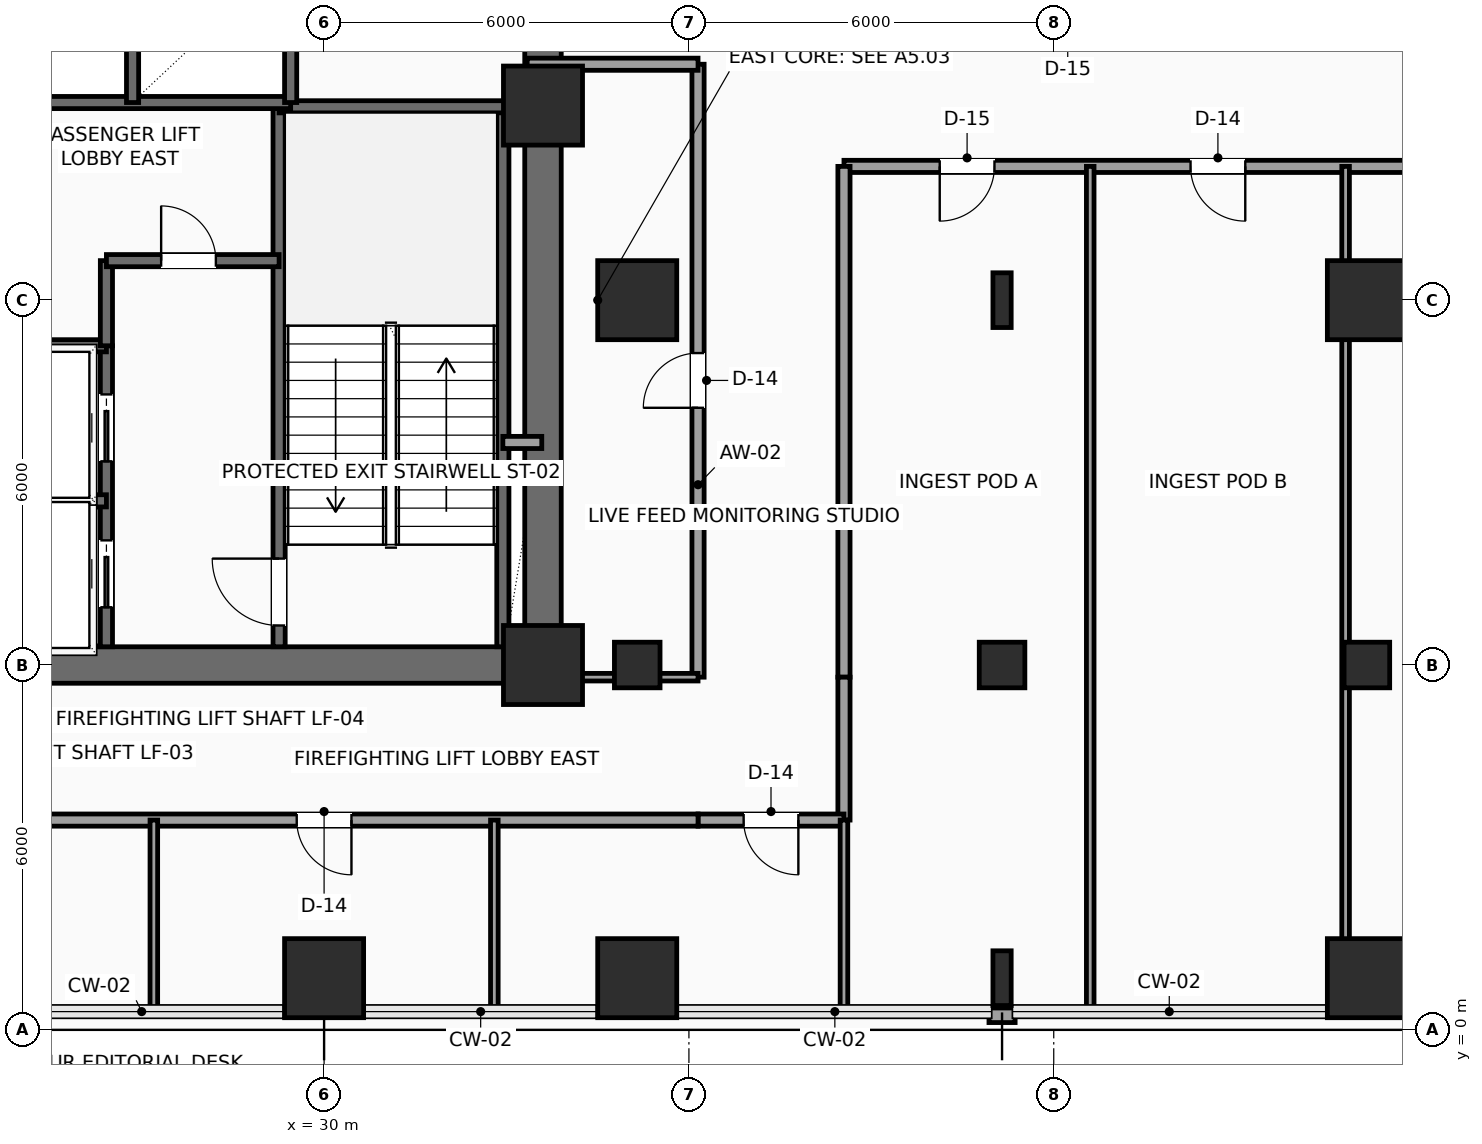
"""IFC4 building model, lengths in metres.
Left out: names, types, materials, properties, quantities, classifications, styles, units other than length and angle.
Written with IfcOpenShell. Run it as: python <this file> out.ifc"""

import sys

from ifc_helpers import new_model, si_unit, direction, frame, frame_2d, origin, origin_2d, place, context, subcontext, project, spatial, rectangle, hollow_rectangle, i_section, extrude, element, fill, save


model = new_model("IFC4")
c1 = context("Model", 3, precision=1e-05, world=origin(), true_north=direction((0.0, 1.0)))
c2 = subcontext(c1, "Body", "Model", "MODEL_VIEW")
j1 = project(units=[si_unit("LENGTHUNIT", "METRE"), si_unit("PLANEANGLEUNIT", "RADIAN")], contexts=[c1])
p1 = place(None, origin())
s1 = spatial("IfcSite", under=j1, at=p1, CompositionType="ELEMENT")
p2 = place(p1, origin())
s2 = spatial("IfcBuilding", under=s1, at=p2, CompositionType="ELEMENT")
p3 = place(p2, frame((0.0, 0.0, 48.0)))
s3 = spatial("IfcBuildingStorey", under=s2, at=p3, CompositionType="ELEMENT", Elevation=48.0)
for number, where, z_axis, x_axis in (
    (1, (33.6, 6.0, 0.0), (0.0, 0.0, 1.0), (1.0, 0.0, 0.0)),
    (2, (33.6, 15.2, 0.0), (0.0, 0.0, 1.0), (1.0, 0.0, 0.0)),
    (3, (30.0, 0.85, 0.0), (0.0, 0.0, 1.0), (1.0, 0.0, 0.0)),
    (4, (35.15, 0.85, 0.0), (0.0, 0.0, 1.0), (1.0, 0.0, 0.0)),
):
    element("IfcColumn", number, at=place(p3, frame(where, z_axis=z_axis, x_axis=x_axis)), inside=s3, PredefinedType="COLUMN", context=c2, shape_type="SweptSolid", body=[
        extrude(rectangle(XDim=1.3, YDim=1.3, at=origin_2d()), origin(), (0.0, 0.0, 1.0), 3.9),
    ])
p4 = place(p3, frame((35.15, 6.0, 0.0), z_axis=(0.0, 0.0, 1.0), x_axis=(1.0, 0.0, 0.0)))
e5 = element("IfcColumn", 5, at=p4, inside=s3, PredefinedType="COLUMN", context=c2, shape_type="SweptSolid", body=[
    extrude(hollow_rectangle(XDim=0.75, YDim=0.75, WallThickness=0.035, InnerFilletRadius=0.035, OuterFilletRadius=0.05, at=origin_2d()), origin(), (0.0, 0.0, 1.0), 3.9),
])
p5 = place(p3, frame((35.15, 12.0, 0.0), z_axis=(0.0, 0.0, 1.0), x_axis=(1.0, 0.0, 0.0)))
e6 = element("IfcColumn", 6, at=p5, inside=s3, PredefinedType="COLUMN", context=c2, shape_type="SweptSolid", body=[
    extrude(rectangle(XDim=1.3, YDim=1.3, at=origin_2d()), origin(), (0.0, 0.0, 1.0), 3.9),
])
p6 = place(p3, frame((41.15, 0.85, 0.0), z_axis=(0.0, 0.0, 1.0), x_axis=(1.0, 0.0, 0.0)))
e7 = element("IfcColumn", 7, at=p6, inside=s3, PredefinedType="COLUMN", context=c2, shape_type="SweptSolid", body=[
    extrude(i_section(OverallWidth=0.3, OverallDepth=0.9, WebThickness=0.019, FlangeThickness=0.035, FilletRadius=0.03, at=origin_2d()), origin(), (0.0, 0.0, 1.0), 3.9),
])
p7 = place(p3, frame((41.15, 6.0, 0.0), z_axis=(0.0, 0.0, 1.0), x_axis=(1.0, 0.0, 0.0)))
e8 = element("IfcColumn", 8, at=p7, inside=s3, PredefinedType="COLUMN", context=c2, shape_type="SweptSolid", body=[
    extrude(hollow_rectangle(XDim=0.75, YDim=0.75, WallThickness=0.035, InnerFilletRadius=0.035, OuterFilletRadius=0.05, at=origin_2d()), origin(), (0.0, 0.0, 1.0), 3.9),
])
p8 = place(p3, frame((41.15, 12.0, 0.0), z_axis=(0.0, 0.0, 1.0), x_axis=(1.0, 0.0, 0.0)))
e9 = element("IfcColumn", 9, at=p8, inside=s3, PredefinedType="COLUMN", context=c2, shape_type="SweptSolid", body=[
    extrude(i_section(OverallWidth=0.3, OverallDepth=0.9, WebThickness=0.019, FlangeThickness=0.035, FilletRadius=0.03, at=origin_2d()), origin(), (0.0, 0.0, 1.0), 3.9),
])
p9 = place(p3, frame((47.15, 0.85, 0.0), z_axis=(0.0, 0.0, 1.0), x_axis=(1.0, 0.0, 0.0)))
e10 = element("IfcColumn", 10, at=p9, inside=s3, PredefinedType="COLUMN", context=c2, shape_type="SweptSolid", body=[
    extrude(rectangle(XDim=1.3, YDim=1.3, at=origin_2d()), origin(), (0.0, 0.0, 1.0), 3.9),
])
p10 = place(p3, frame((47.15, 6.0, 0.0), z_axis=(0.0, 0.0, 1.0), x_axis=(1.0, 0.0, 0.0)))
e11 = element("IfcColumn", 11, at=p10, inside=s3, PredefinedType="COLUMN", context=c2, shape_type="SweptSolid", body=[
    extrude(hollow_rectangle(XDim=0.75, YDim=0.75, WallThickness=0.035, InnerFilletRadius=0.035, OuterFilletRadius=0.05, at=origin_2d()), origin(), (0.0, 0.0, 1.0), 3.9),
])
p11 = place(p3, frame((47.15, 12.0, 0.0), z_axis=(0.0, 0.0, 1.0), x_axis=(1.0, 0.0, 0.0)))
e12 = element("IfcColumn", 12, at=p11, inside=s3, PredefinedType="COLUMN", context=c2, shape_type="SweptSolid", body=[
    extrude(rectangle(XDim=1.3, YDim=1.3, at=origin_2d()), origin(), (0.0, 0.0, 1.0), 3.9),
])
p12 = place(p3, frame((41.365, 0.24, 0.0), z_axis=(0.0, 0.0, 1.0), x_axis=(-1.0, 0.0, 0.0)))
e13 = element("IfcWall", 13, at=p12, inside=s3, PredefinedType="SOLIDWALL", context=c2, shape_type="SweptSolid", body=[
    extrude(rectangle(XDim=0.43, YDim=0.24, at=frame_2d((0.215, 0.0))), origin(), (0.0, 0.0, 1.0), 3.65),
])
p13 = place(p3, frame((24.0, 6.0, 0.0), z_axis=(0.0, 0.0, 1.0), x_axis=(1.0, 0.0, 0.0)))
e14 = element("IfcWall", 14, at=p13, inside=s3, PredefinedType="SHEAR", context=c2, shape_type="SweptSolid", body=[
    extrude(rectangle(XDim=9.6, YDim=0.6, at=frame_2d((4.8, 0.0))), origin(), (0.0, 0.0, 1.0), 3.65),
])
p14 = place(p3, frame((33.6, 6.0, 0.0), z_axis=(0.0, 0.0, 1.0), x_axis=(0.0, 1.0, 0.0)))
e15 = element("IfcWall", 15, at=p14, inside=s3, PredefinedType="SHEAR", context=c2, shape_type="SweptSolid", body=[
    extrude(rectangle(XDim=12.0, YDim=0.6, at=frame_2d((6.0, 0.0))), origin(), (0.0, 0.0, 1.0), 3.65),
])
p15 = place(p14, frame((10.2, 0.0, 0.0)))
e16 = element("IfcOpeningElement", 16, at=p15, cuts=e15, PredefinedType="OPENING", context=c2, shape_type="SweptSolid", body=[
    extrude(rectangle(XDim=0.9, YDim=2.15, at=frame_2d((0.45, 1.075))), frame((0.0, 0.31, 0.0), z_axis=(0.0, -1.0, 0.0), x_axis=(1.0, 0.0, 0.0)), (0.0, 0.0, 1.0), 0.62),
])
p16 = place(p3, frame((29.26, 6.3, 0.0), z_axis=(0.0, 0.0, 1.0), x_axis=(0.0, 1.0, 0.0)))
e17 = element("IfcWall", 17, at=p16, inside=s3, PredefinedType="SHEAR", context=c2, shape_type="SweptSolid", body=[
    extrude(rectangle(XDim=8.88, YDim=0.2, at=frame_2d((4.44, 0.0))), origin(), (0.0, 0.0, 1.0), 3.65),
])
p17 = place(p16, frame((0.35, 0.0, 0.0)))
e18 = element("IfcOpeningElement", 18, at=p17, cuts=e17, PredefinedType="OPENING", context=c2, shape_type="SweptSolid", body=[
    extrude(rectangle(XDim=1.1, YDim=2.2, at=frame_2d((0.55, 1.1))), frame((0.0, 0.11, 0.0), z_axis=(0.0, -1.0, 0.0), x_axis=(1.0, 0.0, 0.0)), (0.0, 0.0, 1.0), 0.22),
])
p18 = place(p3, frame((32.94, 6.3, 0.0), z_axis=(0.0, 0.0, 1.0), x_axis=(0.0, 1.0, 0.0)))
e19 = element("IfcWall", 19, at=p18, inside=s3, PredefinedType="SHEAR", context=c2, shape_type="SweptSolid", body=[
    extrude(rectangle(XDim=8.88, YDim=0.2, at=frame_2d((4.44, 0.0))), origin(), (0.0, 0.0, 1.0), 3.65),
])
p19 = place(p3, frame((29.26, 15.18, 0.0), z_axis=(0.0, 0.0, 1.0), x_axis=(1.0, 0.0, 0.0)))
e20 = element("IfcWall", 20, at=p19, inside=s3, PredefinedType="SHEAR", context=c2, shape_type="SweptSolid", body=[
    extrude(rectangle(XDim=4.04, YDim=0.2, at=frame_2d((2.02, 0.0))), origin(), (0.0, 0.0, 1.0), 3.65),
])
p20 = place(p3, frame((26.42, 6.3, 0.0), z_axis=(0.0, 0.0, 1.0), x_axis=(0.0, 1.0, 0.0)))
e21 = element("IfcWall", 21, at=p20, inside=s3, PredefinedType="SHEAR", context=c2, shape_type="SweptSolid", body=[
    extrude(rectangle(XDim=4.95, YDim=0.2, at=frame_2d((2.475, 0.0))), origin(), (0.0, 0.0, 1.0), 3.65),
])
p21 = place(p20, frame((0.65, 0.0, 0.0)))
e22 = element("IfcOpeningElement", 22, at=p21, cuts=e21, PredefinedType="OPENING", context=c2, shape_type="SweptSolid", body=[
    extrude(rectangle(XDim=1.1, YDim=2.2, at=frame_2d((0.55, 1.1))), frame((0.0, 0.11, 0.0), z_axis=(0.0, -1.0, 0.0), x_axis=(1.0, 0.0, 0.0)), (0.0, 0.0, 1.0), 0.22),
])
p22 = place(p20, frame((3.05, 0.0, 0.0)))
e23 = element("IfcOpeningElement", 23, at=p22, cuts=e21, PredefinedType="OPENING", context=c2, shape_type="SweptSolid", body=[
    extrude(rectangle(XDim=1.1, YDim=2.2, at=frame_2d((0.55, 1.1))), frame((0.0, 0.11, 0.0), z_axis=(0.0, -1.0, 0.0), x_axis=(1.0, 0.0, 0.0)), (0.0, 0.0, 1.0), 0.22),
])
for number, where, z_axis, x_axis in (
    (24, (24.25, 8.7, 0.0), (0.0, 0.0, 1.0), (1.0, 0.0, 0.0)),
    (25, (24.25, 11.25, 0.0), (0.0, 0.0, 1.0), (1.0, 0.0, 0.0)),
):
    element("IfcWall", number, at=place(p3, frame(where, z_axis=z_axis, x_axis=x_axis)), inside=s3, PredefinedType="SHEAR", context=c2, shape_type="SweptSolid", body=[
        extrude(rectangle(XDim=2.17, YDim=0.2, at=frame_2d((1.085, 0.0))), origin(), (0.0, 0.0, 1.0), 3.65),
    ])
p23 = place(p3, frame((26.42, 11.25, 0.0), z_axis=(0.0, 0.0, 1.0), x_axis=(0.0, 1.0, 0.0)))
e26 = element("IfcWall", 26, at=p23, inside=s3, PredefinedType="SHEAR", context=c2, shape_type="SweptSolid", body=[
    extrude(rectangle(XDim=1.4, YDim=0.2, at=frame_2d((0.7, 0.0))), origin(), (0.0, 0.0, 1.0), 3.65),
])
p24 = place(p3, frame((26.42, 12.65, 0.0), z_axis=(0.0, 0.0, 1.0), x_axis=(1.0, 0.0, 0.0)))
e27 = element("IfcWall", 27, at=p24, inside=s3, PredefinedType="SHEAR", context=c2, shape_type="SweptSolid", body=[
    extrude(rectangle(XDim=2.84, YDim=0.2, at=frame_2d((1.42, 0.0))), origin(), (0.0, 0.0, 1.0), 3.65),
])
p25 = place(p24, frame((0.9, 0.0, 0.0)))
e28 = element("IfcOpeningElement", 28, at=p25, cuts=e27, PredefinedType="OPENING", context=c2, shape_type="SweptSolid", body=[
    extrude(rectangle(XDim=0.9, YDim=2.15, at=frame_2d((0.45, 1.075))), frame((0.0, 0.11, 0.0), z_axis=(0.0, -1.0, 0.0), x_axis=(1.0, 0.0, 0.0)), (0.0, 0.0, 1.0), 0.22),
])
p26 = place(p3, frame((32.94, 9.66, 0.0), z_axis=(0.0, 0.0, 1.0), x_axis=(1.0, 0.0, 0.0)))
e29 = element("IfcWall", 29, at=p26, inside=s3, PredefinedType="SOLIDWALL", context=c2, shape_type="SweptSolid", body=[
    extrude(rectangle(XDim=0.64, YDim=0.2, at=frame_2d((0.32, 0.0))), origin(), (0.0, 0.0, 1.0), 3.65),
])
p27 = place(p3, frame((24.25, 15.25, 0.0), z_axis=(0.0, 0.0, 1.0), x_axis=(1.0, 0.0, 0.0)))
e30 = element("IfcWall", 30, at=p27, inside=s3, PredefinedType="SHEAR", context=c2, shape_type="SweptSolid", body=[
    extrude(rectangle(XDim=5.2, YDim=0.2, at=frame_2d((2.6, 0.0))), origin(), (0.0, 0.0, 1.0), 3.65),
])
p28 = place(p3, frame((26.85, 15.25, 0.0), z_axis=(0.0, 0.0, 1.0), x_axis=(0.0, 1.0, 0.0)))
e31 = element("IfcWall", 31, at=p28, inside=s3, PredefinedType="SHEAR", context=c2, shape_type="SweptSolid", body=[
    extrude(rectangle(XDim=2.4, YDim=0.2, at=frame_2d((1.2, 0.0))), origin(), (0.0, 0.0, 1.0), 3.65),
])
p29 = place(p3, frame((29.45, 15.25, 0.0), z_axis=(0.0, 0.0, 1.0), x_axis=(0.0, 1.0, 0.0)))
e32 = element("IfcWall", 32, at=p29, inside=s3, PredefinedType="SHEAR", context=c2, shape_type="SweptSolid", body=[
    extrude(rectangle(XDim=2.45, YDim=0.2, at=frame_2d((1.225, 0.0))), origin(), (0.0, 0.0, 1.0), 3.65),
])
p30 = place(p3, frame((36.15, 5.8, 0.0), z_axis=(0.0, 0.0, 1.0), x_axis=(0.0, 1.0, 0.0)))
e33 = element("IfcWall", 33, at=p30, inside=s3, PredefinedType="PARTITIONING", context=c2, shape_type="SweptSolid", body=[
    extrude(rectangle(XDim=10.08, YDim=0.2, at=frame_2d((5.04, 0.0))), origin(), (0.0, 0.0, 1.0), 3.65),
])
p31 = place(p30, frame((4.43, 0.0, 0.0)))
e34 = element("IfcOpeningElement", 34, at=p31, cuts=e33, PredefinedType="OPENING", context=c2, shape_type="SweptSolid", body=[
    extrude(rectangle(XDim=0.9, YDim=2.1, at=frame_2d((0.45, 1.05))), frame((0.0, 0.11, 0.0), z_axis=(0.0, -1.0, 0.0), x_axis=(1.0, 0.0, 0.0)), (0.0, 0.0, 1.0), 0.22),
])
p32 = place(p3, frame((36.15, 15.88, 0.0), z_axis=(0.0, 0.0, 1.0), x_axis=(-1.0, 0.0, 0.0)))
e35 = element("IfcWall", 35, at=p32, inside=s3, PredefinedType="PARTITIONING", context=c2, shape_type="SweptSolid", body=[
    extrude(rectangle(XDim=2.81, YDim=0.2, at=frame_2d((1.405, 0.0))), origin(), (0.0, 0.0, 1.0), 3.65),
])
p33 = place(p3, frame((50.9, 14.2, 0.0), z_axis=(0.0, 0.0, 1.0), x_axis=(-1.0, 0.0, 0.0)))
e36 = element("IfcWall", 36, at=p33, inside=s3, PredefinedType="PARTITIONING", context=c2, shape_type="SweptSolid", body=[
    extrude(rectangle(XDim=12.35, YDim=0.2, at=frame_2d((6.175, 0.0))), origin(), (0.0, 0.0, 1.0), 3.65),
])
p34 = place(p33, frame((9.875, 0.0, 0.0)))
e37 = element("IfcOpeningElement", 37, at=p34, cuts=e36, PredefinedType="OPENING", context=c2, shape_type="SweptSolid", body=[
    extrude(rectangle(XDim=0.9, YDim=2.1, at=frame_2d((0.45, 1.05))), frame((0.0, 0.11, 0.0), z_axis=(0.0, -1.0, 0.0), x_axis=(1.0, 0.0, 0.0)), (0.0, 0.0, 1.0), 0.22),
])
p35 = place(p33, frame((5.75, 0.0, 0.0)))
e38 = element("IfcOpeningElement", 38, at=p35, cuts=e36, PredefinedType="OPENING", context=c2, shape_type="SweptSolid", body=[
    extrude(rectangle(XDim=0.9, YDim=2.1, at=frame_2d((0.45, 1.05))), frame((0.0, 0.11, 0.0), z_axis=(0.0, -1.0, 0.0), x_axis=(1.0, 0.0, 0.0)), (0.0, 0.0, 1.0), 0.22),
])
p36 = place(p33, frame((1.6, 0.0, 0.0)))
e39 = element("IfcOpeningElement", 39, at=p36, cuts=e36, PredefinedType="OPENING", context=c2, shape_type="SweptSolid", body=[
    extrude(rectangle(XDim=0.9, YDim=2.1, at=frame_2d((0.45, 1.05))), frame((0.0, 0.11, 0.0), z_axis=(0.0, -1.0, 0.0), x_axis=(1.0, 0.0, 0.0)), (0.0, 0.0, 1.0), 0.22),
])
p37 = place(p3, frame((38.55, 14.2, 0.0), z_axis=(0.0, 0.0, 1.0), x_axis=(0.0, -1.0, 0.0)))
e40 = element("IfcWall", 40, at=p37, inside=s3, PredefinedType="PARTITIONING", context=c2, shape_type="SweptSolid", body=[
    extrude(rectangle(XDim=8.4, YDim=0.2, at=frame_2d((4.2, 0.0))), origin(), (0.0, 0.0, 1.0), 3.65),
])
p38 = place(p3, frame((38.55, 5.8, 0.0), z_axis=(0.0, 0.0, 1.0), x_axis=(0.0, -1.0, 0.0)))
e41 = element("IfcWall", 41, at=p38, inside=s3, PredefinedType="PARTITIONING", context=c2, shape_type="SweptSolid", body=[
    extrude(rectangle(XDim=2.35, YDim=0.2, at=frame_2d((1.175, 0.0))), origin(), (0.0, 0.0, 1.0), 3.65),
])
p39 = place(p3, frame((38.55, 3.45, 0.0), z_axis=(0.0, 0.0, 1.0), x_axis=(-1.0, 0.0, 0.0)))
e42 = element("IfcWall", 42, at=p39, inside=s3, PredefinedType="PARTITIONING", context=c2, shape_type="SweptSolid", body=[
    extrude(rectangle(XDim=2.4, YDim=0.2, at=frame_2d((1.2, 0.0))), origin(), (0.0, 0.0, 1.0), 3.142),
])
p40 = place(p39, frame((0.75, 0.0, 0.0)))
e43 = element("IfcOpeningElement", 43, at=p40, cuts=e42, PredefinedType="OPENING", context=c2, shape_type="SweptSolid", body=[
    extrude(rectangle(XDim=0.9, YDim=2.1, at=frame_2d((0.45, 1.05))), frame((0.0, 0.11, 0.0), z_axis=(0.0, -1.0, 0.0), x_axis=(1.0, 0.0, 0.0)), (0.0, 0.0, 1.0), 0.22),
])
p41 = place(p3, frame((36.15, 3.45, 0.0), z_axis=(0.0, 0.0, 1.0), x_axis=(-1.0, 0.0, 0.0)))
e44 = element("IfcWall", 44, at=p41, inside=s3, PredefinedType="PARTITIONING", context=c2, shape_type="SweptSolid", body=[
    extrude(rectangle(XDim=14.6, YDim=0.2, at=frame_2d((7.3, 0.0))), origin(), (0.0, 0.0, 1.0), 3.142),
])
p42 = place(p41, frame((11.325, 0.0, 0.0)))
e45 = element("IfcOpeningElement", 45, at=p42, cuts=e44, PredefinedType="OPENING", context=c2, shape_type="SweptSolid", body=[
    extrude(rectangle(XDim=0.9, YDim=2.1, at=frame_2d((0.45, 1.05))), frame((0.0, 0.11, 0.0), z_axis=(0.0, -1.0, 0.0), x_axis=(1.0, 0.0, 0.0)), (0.0, 0.0, 1.0), 0.22),
])
p43 = place(p41, frame((5.7, 0.0, 0.0)))
e46 = element("IfcOpeningElement", 46, at=p43, cuts=e44, PredefinedType="OPENING", context=c2, shape_type="SweptSolid", body=[
    extrude(rectangle(XDim=0.9, YDim=2.1, at=frame_2d((0.45, 1.05))), frame((0.0, 0.11, 0.0), z_axis=(0.0, -1.0, 0.0), x_axis=(1.0, 0.0, 0.0)), (0.0, 0.0, 1.0), 0.22),
])
for number, where, z_axis, x_axis in (
    (47, (42.6, 0.3, 0.0), (0.0, 0.0, 1.0), (0.0, 1.0, 0.0)),
    (48, (46.8, 0.3, 0.0), (0.0, 0.0, 1.0), (0.0, 1.0, 0.0)),
):
    element("IfcWall", number, at=place(p3, frame(where, z_axis=z_axis, x_axis=x_axis)), inside=s3, PredefinedType="PARTITIONING", context=c2, shape_type="SweptSolid", body=[
        extrude(rectangle(XDim=13.9, YDim=0.125, at=frame_2d((6.95, 0.0))), origin(), (0.0, 0.0, 1.0), 3.65),
    ])
p44 = place(p3, frame((46.8, 0.3, 0.0), z_axis=(0.0, 0.0, 1.0), x_axis=(0.999973308199, 0.007306359489, 0.0)))
e49 = element("IfcWall", 49, at=p44, inside=s3, PredefinedType="PARTITIONING", context=c2, shape_type="SweptSolid", body=[
    extrude(rectangle(XDim=6.85, YDim=0.125, at=frame_2d((3.425, 0.0))), origin(), (0.0, 0.0, 1.0), 3.65),
])
for number, where, z_axis, x_axis in (
    (50, (27.2, 0.3, 0.0), (0.0, 0.0, 1.0), (0.0, 1.0, 0.0)),
    (51, (32.8, 0.3, 0.0), (0.0, 0.0, 1.0), (0.0, 1.0, 0.0)),
    (52, (38.55, 0.3, 0.0), (0.0, 0.0, 1.0), (0.0, 1.0, 0.0)),
):
    element("IfcWall", number, at=place(p3, frame(where, z_axis=z_axis, x_axis=x_axis)), inside=s3, PredefinedType="PARTITIONING", context=c2, shape_type="SweptSolid", body=[
        extrude(rectangle(XDim=3.15, YDim=0.125, at=frame_2d((1.575, 0.0))), origin(), (0.0, 0.0, 1.0), 3.65),
    ])
p45 = place(p3, frame((33.65, 5.8, 0.0), z_axis=(0.0, 0.0, 1.0), x_axis=(1.0, 0.0, 0.0)))
e53 = element("IfcWall", 53, at=p45, inside=s3, PredefinedType="PARTITIONING", context=c2, shape_type="SweptSolid", body=[
    extrude(rectangle(XDim=2.5, YDim=0.125, at=frame_2d((1.25, 0.0))), origin(), (0.0, 0.0, 1.0), 2.992),
])
p46 = place(p17, origin())
e54 = element("IfcDoor", 54, at=p46, inside=s3, OperationType="SINGLE_SWING_RIGHT", PredefinedType="DOOR", context=c2, shape_type="SweptSolid", body=[
    extrude(rectangle(XDim=1.1, YDim=2.2, at=frame_2d((0.55, 1.1))), frame((0.0, 0.025, 0.0), z_axis=(0.0, -1.0, 0.0), x_axis=(1.0, 0.0, 0.0)), (0.0, 0.0, 1.0), 0.05),
])
fill(e18, e54)
p47 = place(p21, origin())
e55 = element("IfcDoor", 55, at=p47, inside=s3, OperationType="SLIDING_TO_LEFT", PredefinedType="DOOR", context=c2, shape_type="SweptSolid", body=[
    extrude(rectangle(XDim=1.1, YDim=2.2, at=frame_2d((0.55, 1.1))), frame((0.0, 0.025, 0.0), z_axis=(0.0, -1.0, 0.0), x_axis=(1.0, 0.0, 0.0)), (0.0, 0.0, 1.0), 0.05),
])
fill(e22, e55)
p48 = place(p22, origin())
e56 = element("IfcDoor", 56, at=p48, inside=s3, OperationType="SLIDING_TO_LEFT", PredefinedType="DOOR", context=c2, shape_type="SweptSolid", body=[
    extrude(rectangle(XDim=1.1, YDim=2.2, at=frame_2d((0.55, 1.1))), frame((0.0, 0.025, 0.0), z_axis=(0.0, -1.0, 0.0), x_axis=(1.0, 0.0, 0.0)), (0.0, 0.0, 1.0), 0.05),
])
fill(e23, e56)
p49 = place(p25, origin())
e57 = element("IfcDoor", 57, at=p49, inside=s3, OperationType="SINGLE_SWING_LEFT", PredefinedType="DOOR", context=c2, shape_type="SweptSolid", body=[
    extrude(rectangle(XDim=0.9, YDim=2.15, at=frame_2d((0.45, 1.075))), frame((0.0, 0.025, 0.0), z_axis=(0.0, -1.0, 0.0), x_axis=(1.0, 0.0, 0.0)), (0.0, 0.0, 1.0), 0.05),
])
fill(e28, e57)
p50 = place(p31, origin())
e58 = element("IfcDoor", 58, at=p50, inside=s3, OperationType="SINGLE_SWING_LEFT", PredefinedType="DOOR", context=c2, shape_type="SweptSolid", body=[
    extrude(rectangle(XDim=0.9, YDim=2.1, at=frame_2d((0.45, 1.05))), frame((0.0, 0.025, 0.0), z_axis=(0.0, -1.0, 0.0), x_axis=(1.0, 0.0, 0.0)), (0.0, 0.0, 1.0), 0.05),
])
fill(e34, e58)
p51 = place(p34, origin())
e59 = element("IfcDoor", 59, at=p51, inside=s3, OperationType="SINGLE_SWING_RIGHT", PredefinedType="DOOR", context=c2, shape_type="SweptSolid", body=[
    extrude(rectangle(XDim=0.9, YDim=2.1, at=frame_2d((0.45, 1.05))), frame((0.0, 0.025, 0.0), z_axis=(0.0, -1.0, 0.0), x_axis=(1.0, 0.0, 0.0)), (0.0, 0.0, 1.0), 0.05),
])
fill(e37, e59)
p52 = place(p35, origin())
e60 = element("IfcDoor", 60, at=p52, inside=s3, OperationType="SINGLE_SWING_LEFT", PredefinedType="DOOR", context=c2, shape_type="SweptSolid", body=[
    extrude(rectangle(XDim=0.9, YDim=2.1, at=frame_2d((0.45, 1.05))), frame((0.0, 0.025, 0.0), z_axis=(0.0, -1.0, 0.0), x_axis=(1.0, 0.0, 0.0)), (0.0, 0.0, 1.0), 0.05),
])
fill(e38, e60)
p53 = place(p40, origin())
e61 = element("IfcDoor", 61, at=p53, inside=s3, OperationType="SINGLE_SWING_LEFT", PredefinedType="DOOR", context=c2, shape_type="SweptSolid", body=[
    extrude(rectangle(XDim=0.9, YDim=2.1, at=frame_2d((0.45, 1.05))), frame((0.0, 0.025, 0.0), z_axis=(0.0, -1.0, 0.0), x_axis=(1.0, 0.0, 0.0)), (0.0, 0.0, 1.0), 0.05),
])
fill(e43, e61)
p54 = place(p43, origin())
e62 = element("IfcDoor", 62, at=p54, inside=s3, OperationType="SINGLE_SWING_LEFT", PredefinedType="DOOR", context=c2, shape_type="SweptSolid", body=[
    extrude(rectangle(XDim=0.9, YDim=2.1, at=frame_2d((0.45, 1.05))), frame((0.0, 0.025, 0.0), z_axis=(0.0, -1.0, 0.0), x_axis=(1.0, 0.0, 0.0)), (0.0, 0.0, 1.0), 0.05),
])
fill(e46, e62)
save(model, sys.argv[1])
